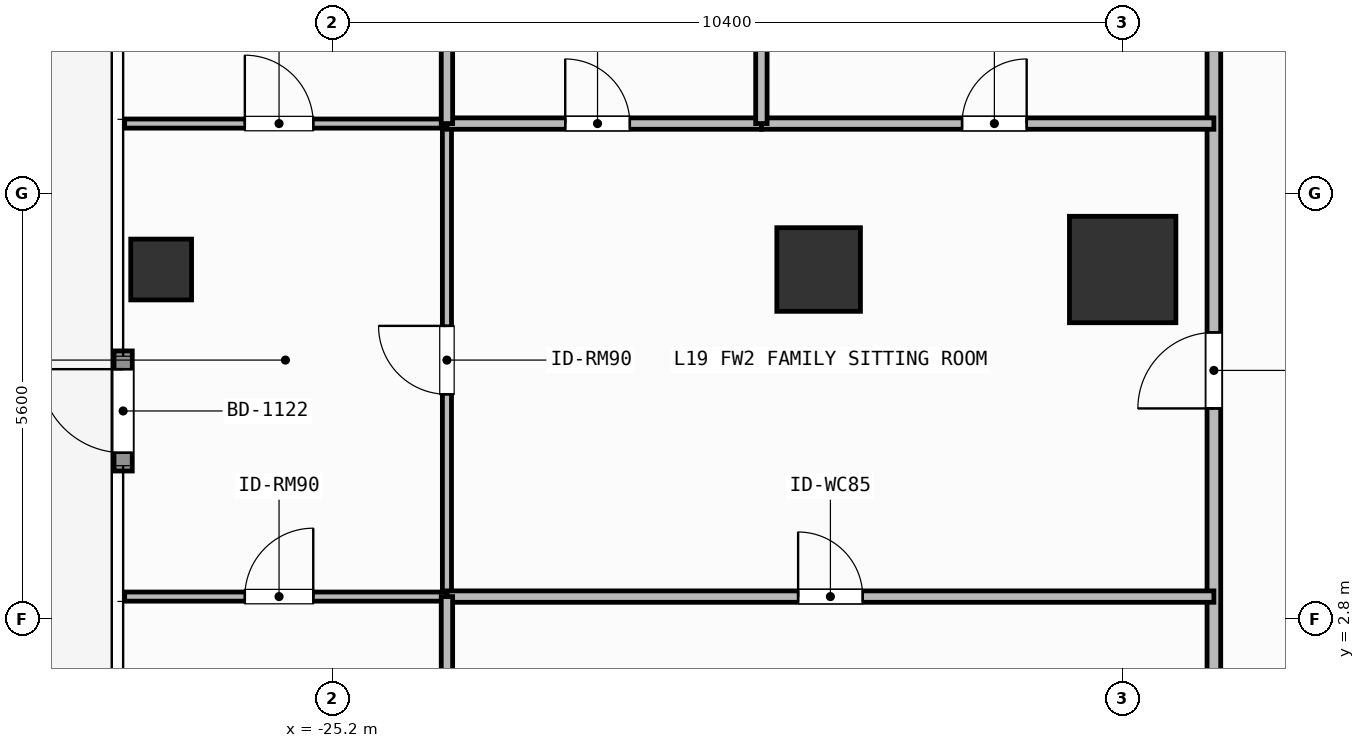
"""IFC4 building model, lengths in metres.
Left out: names, types, materials, properties, quantities, classifications, styles, units other than length and angle.
Written with IfcOpenShell. Run it as: python <this file> out.ifc"""

import sys

from ifc_helpers import new_model, si_unit, direction, frame, frame_2d, origin, origin_2d, place, context, subcontext, project, spatial, rectangle, hollow_rectangle, extrude, element, fill, save


model = new_model("IFC4")
c1 = context("Model", 3, precision=1e-05, world=origin(), true_north=direction((0.0, 1.0)))
c2 = subcontext(c1, "Body", "Model", "MODEL_VIEW")
j1 = project(units=[si_unit("LENGTHUNIT", "METRE"), si_unit("PLANEANGLEUNIT", "RADIAN")], contexts=[c1])
p1 = place(None, origin())
s1 = spatial("IfcSite", under=j1, at=p1, CompositionType="ELEMENT")
p2 = place(p1, origin())
s2 = spatial("IfcBuilding", under=s1, at=p2, CompositionType="ELEMENT")
p3 = place(p2, frame((0.0, 0.0, 73.5)))
s3 = spatial("IfcBuildingStorey", under=s2, at=p3, CompositionType="ELEMENT", Elevation=73.5)
p4 = place(p3, frame((-14.8, 7.4, 0.0), z_axis=(0.0, 0.0, 1.0), x_axis=(1.0, 0.0, 0.0)))
e1 = element("IfcColumn", 1, at=p4, inside=s3, PredefinedType="COLUMN", context=c2, shape_type="SweptSolid", body=[
    extrude(rectangle(XDim=1.4, YDim=1.4, at=origin_2d()), origin(), (0.0, 0.0, 1.0), 3.9),
])
p5 = place(p3, frame((-18.8, 7.4, 0.0), z_axis=(0.0, 0.0, 1.0), x_axis=(1.0, 0.0, 0.0)))
e2 = element("IfcColumn", 2, at=p5, inside=s3, PredefinedType="COLUMN", context=c2, shape_type="SweptSolid", body=[
    extrude(rectangle(XDim=1.1, YDim=1.1, at=origin_2d()), origin(), (0.0, 0.0, 1.0), 3.9),
])
p6 = place(p3, frame((-27.45, 7.4, 0.0), z_axis=(0.0, 0.0, 1.0), x_axis=(1.0, 0.0, 0.0)))
e3 = element("IfcColumn", 3, at=p6, inside=s3, PredefinedType="COLUMN", context=c2, shape_type="SweptSolid", body=[
    extrude(hollow_rectangle(XDim=0.8, YDim=0.8, WallThickness=0.036, at=origin_2d()), origin(), (0.0, 0.0, 1.0), 3.9),
])
p7 = place(p3, frame((-27.95, 4.749, 0.0), z_axis=(0.0, 0.0, 1.0), x_axis=(0.0, 1.0, 0.0)))
e4 = element("IfcWall", 4, at=p7, inside=s3, PredefinedType="SOLIDWALL", context=c2, shape_type="SweptSolid", body=[
    extrude(rectangle(XDim=1.58, YDim=0.24, at=frame_2d((0.79, 0.0))), origin(), (0.0, 0.0, 1.0), 3.6),
])
p8 = place(p7, frame((0.24, 0.0, 0.0)))
e5 = element("IfcOpeningElement", 5, at=p8, cuts=e4, PredefinedType="OPENING", context=c2, shape_type="SweptSolid", body=[
    extrude(rectangle(XDim=1.1, YDim=2.2, at=frame_2d((0.55, 1.1))), frame((0.0, 0.13, 0.0), z_axis=(0.0, -1.0, 0.0), x_axis=(1.0, 0.0, 0.0)), (0.0, 0.0, 1.0), 0.26),
])
p9 = place(p3, frame((-13.6, -0.873, 0.0), z_axis=(0.0, 0.0, 1.0), x_axis=(0.0, 1.0, 0.0)))
e6 = element("IfcWall", 6, at=p9, inside=s3, PredefinedType="PARTITIONING", context=c2, shape_type="SweptSolid", body=[
    extrude(rectangle(XDim=12.993, YDim=0.18, at=frame_2d((6.497, 0.0))), origin(), (0.0, 0.0, 1.0), 3.6),
])
p10 = place(p9, frame((6.446, 0.0, 0.0)))
e7 = element("IfcOpeningElement", 7, at=p10, cuts=e6, PredefinedType="OPENING", context=c2, shape_type="SweptSolid", body=[
    extrude(rectangle(XDim=1.0, YDim=2.2, at=frame_2d((0.5, 1.1))), frame((0.0, 0.1, 0.0), z_axis=(0.0, -1.0, 0.0), x_axis=(1.0, 0.0, 0.0)), (0.0, 0.0, 1.0), 0.2),
])
p11 = place(p3, frame((-23.69, 3.097, 0.0), z_axis=(0.0, 0.0, 1.0), x_axis=(0.0, 1.0, 0.0)))
e8 = element("IfcWall", 8, at=p11, inside=s3, PredefinedType="PARTITIONING", context=c2, shape_type="SweptSolid", body=[
    extrude(rectangle(XDim=6.223, YDim=0.12, at=frame_2d((3.112, 0.0))), origin(), (0.0, 0.0, 1.0), 3.6),
])
p12 = place(p11, frame((2.662, 0.0, 0.0)))
e9 = element("IfcOpeningElement", 9, at=p12, cuts=e8, PredefinedType="OPENING", context=c2, shape_type="SweptSolid", body=[
    extrude(rectangle(XDim=0.9, YDim=2.1, at=frame_2d((0.45, 1.05))), frame((0.0, 0.07, 0.0), z_axis=(0.0, -1.0, 0.0), x_axis=(1.0, 0.0, 0.0)), (0.0, 0.0, 1.0), 0.14),
])
p13 = place(p3, frame((-23.69, 9.32, 0.0), z_axis=(0.0, 0.0, 1.0), x_axis=(1.0, 0.0, 0.0)))
e10 = element("IfcWall", 10, at=p13, inside=s3, PredefinedType="PARTITIONING", context=c2, shape_type="SweptSolid", body=[
    extrude(rectangle(XDim=4.137, YDim=0.15, at=frame_2d((2.068, 0.0))), origin(), (0.0, 0.0, 1.0), 3.6),
])
p14 = place(p13, frame((1.556, 0.0, 0.0)))
e11 = element("IfcOpeningElement", 11, at=p14, cuts=e10, PredefinedType="OPENING", context=c2, shape_type="SweptSolid", body=[
    extrude(rectangle(XDim=0.85, YDim=2.1, at=frame_2d((0.425, 1.05))), frame((0.0, 0.085, 0.0), z_axis=(0.0, -1.0, 0.0), x_axis=(1.0, 0.0, 0.0)), (0.0, 0.0, 1.0), 0.17),
])
p15 = place(p3, frame((-19.553, 9.32, 0.0), z_axis=(0.0, 0.0, 1.0), x_axis=(1.0, 0.0, 0.0)))
e12 = element("IfcWall", 12, at=p15, inside=s3, PredefinedType="PARTITIONING", context=c2, shape_type="SweptSolid", body=[
    extrude(rectangle(XDim=5.953, YDim=0.15, at=frame_2d((2.977, 0.0))), origin(), (0.0, 0.0, 1.0), 3.6),
])
p16 = place(p15, frame((2.64, 0.0, 0.0)))
e13 = element("IfcOpeningElement", 13, at=p16, cuts=e12, PredefinedType="OPENING", context=c2, shape_type="SweptSolid", body=[
    extrude(rectangle(XDim=0.85, YDim=2.1, at=frame_2d((0.425, 1.05))), frame((0.0, 0.085, 0.0), z_axis=(0.0, -1.0, 0.0), x_axis=(1.0, 0.0, 0.0)), (0.0, 0.0, 1.0), 0.17),
])
p17 = place(p3, frame((-23.69, 3.097, 0.0), z_axis=(0.0, 0.0, 1.0), x_axis=(1.0, 0.0, 0.0)))
e14 = element("IfcWall", 14, at=p17, inside=s3, PredefinedType="PARTITIONING", context=c2, shape_type="SweptSolid", body=[
    extrude(rectangle(XDim=10.09, YDim=0.15, at=frame_2d((5.045, 0.0))), origin(), (0.0, 0.0, 1.0), 3.6),
])
p18 = place(p17, frame((4.62, 0.0, 0.0)))
e15 = element("IfcOpeningElement", 15, at=p18, cuts=e14, PredefinedType="OPENING", context=c2, shape_type="SweptSolid", body=[
    extrude(rectangle(XDim=0.85, YDim=2.1, at=frame_2d((0.425, 1.05))), frame((0.0, 0.085, 0.0), z_axis=(0.0, -1.0, 0.0), x_axis=(1.0, 0.0, 0.0)), (0.0, 0.0, 1.0), 0.17),
])
p19 = place(p3, frame((-27.93, 3.097, 0.0), z_axis=(0.0, 0.0, 1.0), x_axis=(1.0, 0.0, 0.0)))
e16 = element("IfcWall", 16, at=p19, inside=s3, PredefinedType="PARTITIONING", context=c2, shape_type="SweptSolid", body=[
    extrude(rectangle(XDim=4.24, YDim=0.12, at=frame_2d((2.12, 0.0))), origin(), (0.0, 0.0, 1.0), 3.6),
])
p20 = place(p19, frame((1.581, 0.0, 0.0)))
e17 = element("IfcOpeningElement", 17, at=p20, cuts=e16, PredefinedType="OPENING", context=c2, shape_type="SweptSolid", body=[
    extrude(rectangle(XDim=0.9, YDim=2.1, at=frame_2d((0.45, 1.05))), frame((0.0, 0.07, 0.0), z_axis=(0.0, -1.0, 0.0), x_axis=(1.0, 0.0, 0.0)), (0.0, 0.0, 1.0), 0.14),
])
p21 = place(p3, frame((-27.93, 9.32, 0.0), z_axis=(0.0, 0.0, 1.0), x_axis=(1.0, 0.0, 0.0)))
e18 = element("IfcWall", 18, at=p21, inside=s3, PredefinedType="PARTITIONING", context=c2, shape_type="SweptSolid", body=[
    extrude(rectangle(XDim=4.24, YDim=0.12, at=frame_2d((2.12, 0.0))), origin(), (0.0, 0.0, 1.0), 3.6),
])
p22 = place(p21, frame((1.581, 0.0, 0.0)))
e19 = element("IfcOpeningElement", 19, at=p22, cuts=e18, PredefinedType="OPENING", context=c2, shape_type="SweptSolid", body=[
    extrude(rectangle(XDim=0.9, YDim=2.1, at=frame_2d((0.45, 1.05))), frame((0.0, 0.07, 0.0), z_axis=(0.0, -1.0, 0.0), x_axis=(1.0, 0.0, 0.0)), (0.0, 0.0, 1.0), 0.14),
])
p23 = place(p3, frame((-19.553, 9.32, 0.0), z_axis=(0.0, 0.0, 1.0), x_axis=(0.0, 1.0, 0.0)))
e20 = element("IfcWall", 20, at=p23, inside=s3, PredefinedType="PARTITIONING", context=c2, shape_type="SweptSolid", body=[
    extrude(rectangle(XDim=2.8, YDim=0.15, at=frame_2d((1.4, 0.0))), origin(), (0.0, 0.0, 1.0), 3.6),
])
p24 = place(p3, frame((-23.69, -0.873, 0.0), z_axis=(0.0, 0.0, 1.0), x_axis=(0.0, 1.0, 0.0)))
e21 = element("IfcWall", 21, at=p24, inside=s3, PredefinedType="PARTITIONING", context=c2, shape_type="SweptSolid", body=[
    extrude(rectangle(XDim=3.97, YDim=0.15, at=frame_2d((1.985, 0.0))), origin(), (0.0, 0.0, 1.0), 3.6),
])
p25 = place(p3, frame((-23.69, 9.32, 0.0), z_axis=(0.0, 0.0, 1.0), x_axis=(0.0, 1.0, 0.0)))
e22 = element("IfcWall", 22, at=p25, inside=s3, PredefinedType="PARTITIONING", context=c2, shape_type="SweptSolid", body=[
    extrude(rectangle(XDim=2.8, YDim=0.15, at=frame_2d((1.4, 0.0))), origin(), (0.0, 0.0, 1.0), 3.6),
])
p26 = place(p8, origin())
e23 = element("IfcDoor", 23, at=p26, inside=s3, OperationType="SINGLE_SWING_RIGHT", PredefinedType="DOOR", context=c2, shape_type="SweptSolid", body=[
    extrude(rectangle(XDim=1.1, YDim=2.2, at=frame_2d((0.55, 1.1))), frame((0.0, 0.025, 0.0), z_axis=(0.0, -1.0, 0.0), x_axis=(1.0, 0.0, 0.0)), (0.0, 0.0, 1.0), 0.05),
])
fill(e5, e23)
p27 = place(p10, origin())
e24 = element("IfcDoor", 24, at=p27, inside=s3, OperationType="SINGLE_SWING_LEFT", PredefinedType="DOOR", context=c2, shape_type="SweptSolid", body=[
    extrude(rectangle(XDim=1.0, YDim=2.2, at=frame_2d((0.5, 1.1))), frame((0.0, 0.025, 0.0), z_axis=(0.0, -1.0, 0.0), x_axis=(1.0, 0.0, 0.0)), (0.0, 0.0, 1.0), 0.05),
])
fill(e7, e24)
p28 = place(p12, origin())
e25 = element("IfcDoor", 25, at=p28, inside=s3, OperationType="SINGLE_SWING_RIGHT", PredefinedType="DOOR", context=c2, shape_type="SweptSolid", body=[
    extrude(rectangle(XDim=0.9, YDim=2.1, at=frame_2d((0.45, 1.05))), frame((0.0, 0.025, 0.0), z_axis=(0.0, -1.0, 0.0), x_axis=(1.0, 0.0, 0.0)), (0.0, 0.0, 1.0), 0.05),
])
fill(e9, e25)
p29 = place(p14, origin())
e26 = element("IfcDoor", 26, at=p29, inside=s3, OperationType="SINGLE_SWING_LEFT", PredefinedType="DOOR", context=c2, shape_type="SweptSolid", body=[
    extrude(rectangle(XDim=0.85, YDim=2.1, at=frame_2d((0.425, 1.05))), frame((0.0, 0.025, 0.0), z_axis=(0.0, -1.0, 0.0), x_axis=(1.0, 0.0, 0.0)), (0.0, 0.0, 1.0), 0.05),
])
fill(e11, e26)
p30 = place(p16, origin())
e27 = element("IfcDoor", 27, at=p30, inside=s3, OperationType="SINGLE_SWING_RIGHT", PredefinedType="DOOR", context=c2, shape_type="SweptSolid", body=[
    extrude(rectangle(XDim=0.85, YDim=2.1, at=frame_2d((0.425, 1.05))), frame((0.0, 0.025, 0.0), z_axis=(0.0, -1.0, 0.0), x_axis=(1.0, 0.0, 0.0)), (0.0, 0.0, 1.0), 0.05),
])
fill(e13, e27)
p31 = place(p18, origin())
e28 = element("IfcDoor", 28, at=p31, inside=s3, OperationType="SINGLE_SWING_LEFT", PredefinedType="DOOR", context=c2, shape_type="SweptSolid", body=[
    extrude(rectangle(XDim=0.85, YDim=2.1, at=frame_2d((0.425, 1.05))), frame((0.0, 0.025, 0.0), z_axis=(0.0, -1.0, 0.0), x_axis=(1.0, 0.0, 0.0)), (0.0, 0.0, 1.0), 0.05),
])
fill(e15, e28)
p32 = place(p20, origin())
e29 = element("IfcDoor", 29, at=p32, inside=s3, OperationType="SINGLE_SWING_RIGHT", PredefinedType="DOOR", context=c2, shape_type="SweptSolid", body=[
    extrude(rectangle(XDim=0.9, YDim=2.1, at=frame_2d((0.45, 1.05))), frame((0.0, 0.025, 0.0), z_axis=(0.0, -1.0, 0.0), x_axis=(1.0, 0.0, 0.0)), (0.0, 0.0, 1.0), 0.05),
])
fill(e17, e29)
p33 = place(p22, origin())
e30 = element("IfcDoor", 30, at=p33, inside=s3, OperationType="SINGLE_SWING_LEFT", PredefinedType="DOOR", context=c2, shape_type="SweptSolid", body=[
    extrude(rectangle(XDim=0.9, YDim=2.1, at=frame_2d((0.45, 1.05))), frame((0.0, 0.025, 0.0), z_axis=(0.0, -1.0, 0.0), x_axis=(1.0, 0.0, 0.0)), (0.0, 0.0, 1.0), 0.05),
])
fill(e19, e30)
save(model, sys.argv[1])
